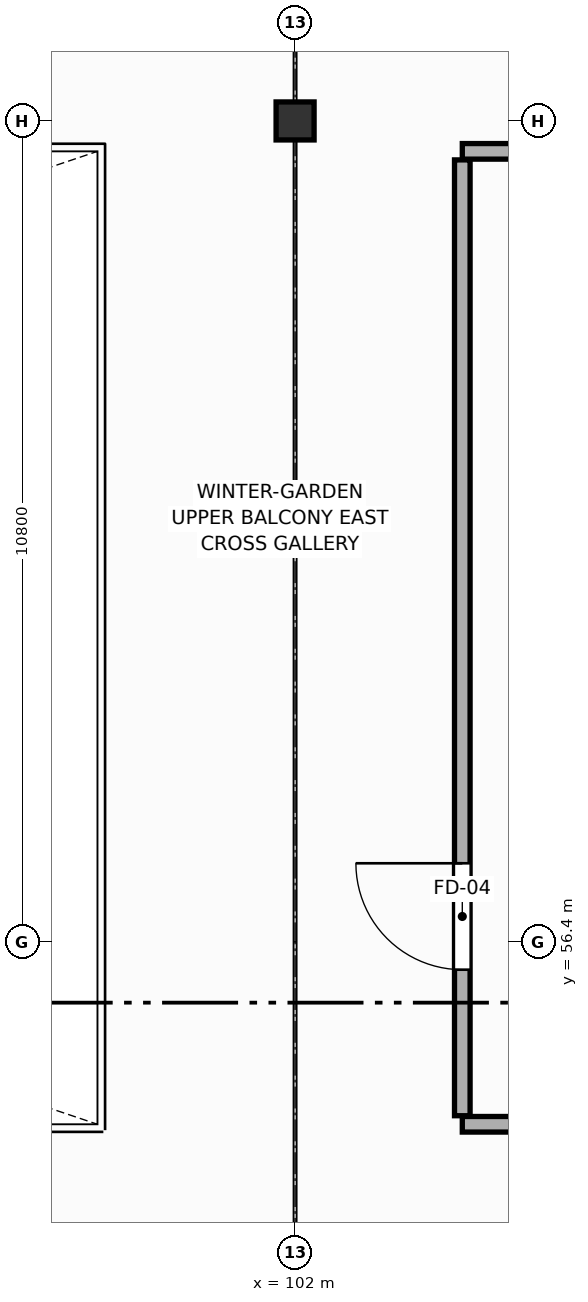
"""IFC4 building model, lengths in metres.
Left out: names, types, materials, properties, quantities, classifications, styles, units other than length and angle.
Written with IfcOpenShell. Run it as: python <this file> out.ifc"""

import sys

from ifc_helpers import new_model, si_unit, direction, frame, frame_2d, origin, origin_2d, place, context, subcontext, project, spatial, rectangle, extrude, element, fill, save


model = new_model("IFC4")
c1 = context("Model", 3, precision=1e-05, world=origin(), true_north=direction((0.0, 1.0)))
c2 = subcontext(c1, "Body", "Model", "MODEL_VIEW")
j1 = project(units=[si_unit("LENGTHUNIT", "METRE"), si_unit("PLANEANGLEUNIT", "RADIAN")], contexts=[c1])
p1 = place(None, origin())
s1 = spatial("IfcSite", under=j1, at=p1, CompositionType="ELEMENT")
p2 = place(p1, origin())
s2 = spatial("IfcBuilding", under=s1, at=p2, CompositionType="ELEMENT")
p3 = place(p2, frame((0.0, 0.0, 9.9)))
s3 = spatial("IfcBuildingStorey", under=s2, at=p3, CompositionType="ELEMENT", Elevation=9.9)
p4 = place(p3, frame((102.0, 67.2, 0.0), z_axis=(0.0, 0.0, 1.0), x_axis=(1.0, 0.0, 0.0)))
e1 = element("IfcColumn", 1, at=p4, inside=s3, PredefinedType="COLUMN", context=c2, shape_type="SweptSolid", body=[
    extrude(rectangle(XDim=0.5, YDim=0.5, at=origin_2d()), origin(), (0.0, 0.0, 1.0), 4.5),
])
for number, where, z_axis, x_axis in (
    (2, (104.2, 66.8, 0.0), (0.0, 0.0, 1.0), (1.0, 0.0, 0.0)),
    (3, (119.2, 54.0, 0.0), (0.0, 0.0, 1.0), (-1.0, 0.0, 0.0)),
):
    element("IfcWall", number, at=place(p3, frame(where, z_axis=z_axis, x_axis=x_axis)), inside=s3, PredefinedType="STANDARD", context=c2, shape_type="SweptSolid", body=[
        extrude(rectangle(XDim=15.0, YDim=0.205, at=frame_2d((7.5, 0.0))), origin(), (0.0, 0.0, 1.0), 3.28),
    ])
p5 = place(p3, frame((104.2, 54.113, 0.0), z_axis=(0.0, 0.0, 1.0), x_axis=(0.0, 1.0, 0.0)))
e4 = element("IfcWall", 4, at=p5, inside=s3, PredefinedType="STANDARD", context=c2, shape_type="SweptSolid", body=[
    extrude(rectangle(XDim=12.575, YDim=0.205, at=frame_2d((6.288, 0.0))), origin(), (0.0, 0.0, 1.0), 3.63),
])
p6 = place(p5, frame((1.921, 0.0, 0.0)))
e5 = element("IfcOpeningElement", 5, at=p6, cuts=e4, PredefinedType="OPENING", context=c2, shape_type="SweptSolid", body=[
    extrude(rectangle(XDim=1.4, YDim=2.25, at=frame_2d((0.7, 1.125))), frame((0.0, 0.113, 0.0), z_axis=(0.0, -1.0, 0.0), x_axis=(1.0, 0.0, 0.0)), (0.0, 0.0, 1.0), 0.225),
])
p7 = place(p6, origin())
e6 = element("IfcDoor", 6, at=p7, inside=s3, OperationType="SINGLE_SWING_RIGHT", PredefinedType="DOOR", context=c2, shape_type="SweptSolid", body=[
    extrude(rectangle(XDim=1.4, YDim=2.25, at=frame_2d((0.7, 1.125))), frame((0.0, 0.025, 0.0), z_axis=(0.0, -1.0, 0.0), x_axis=(1.0, 0.0, 0.0)), (0.0, 0.0, 1.0), 0.05),
])
fill(e5, e6)
save(model, sys.argv[1])
